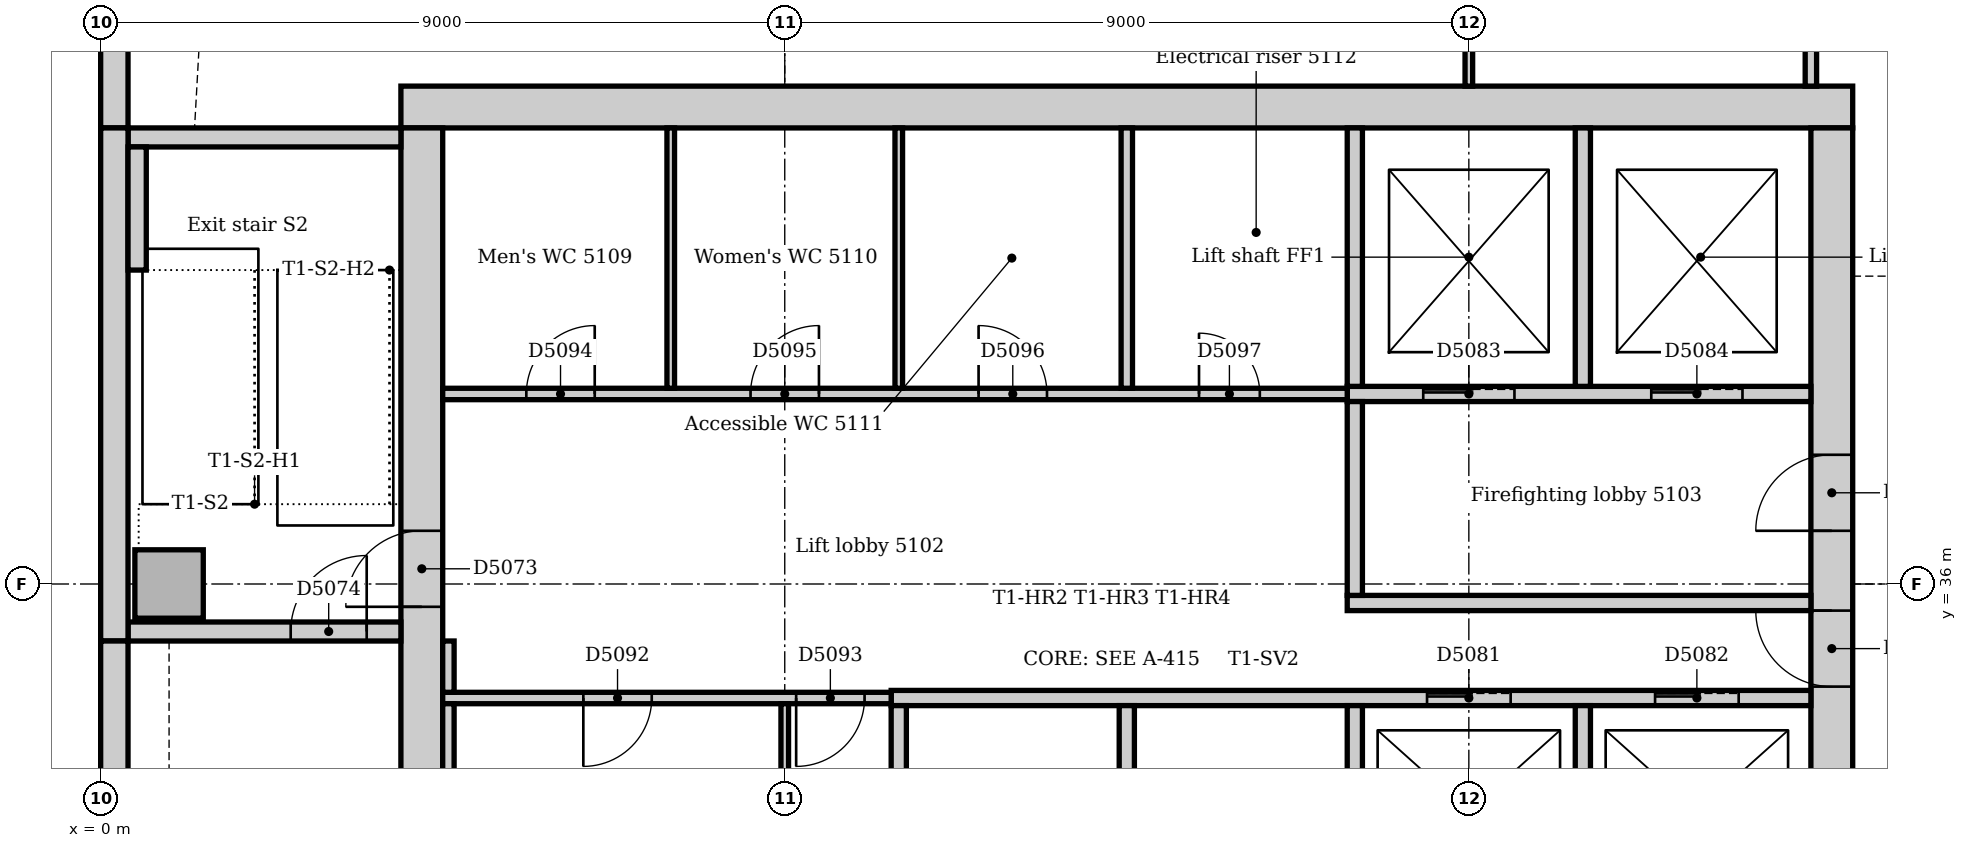
"""IFC4 building model, lengths in metres.
Left out: names, types, materials, properties, quantities, classifications, styles, units other than length and angle.
Written with IfcOpenShell. Run it as: python <this file> out.ifc"""

import sys

from ifc_helpers import new_model, si_unit, direction, frame, frame_2d, origin, origin_2d, place, context, subcontext, project, spatial, rectangle, extrude, element, fill, save


model = new_model("IFC4")
c1 = context("Model", 3, precision=1e-05, world=origin(), true_north=direction((0.0, 1.0)))
c2 = subcontext(c1, "Body", "Model", "MODEL_VIEW")
j1 = project(units=[si_unit("LENGTHUNIT", "METRE"), si_unit("PLANEANGLEUNIT", "RADIAN")], contexts=[c1])
p1 = place(None, origin())
s1 = spatial("IfcSite", under=j1, at=p1, CompositionType="ELEMENT")
p2 = place(p1, origin())
s2 = spatial("IfcBuilding", under=s1, at=p2, CompositionType="ELEMENT")
p3 = place(p2, frame((0.0, 0.0, 214.0)))
s3 = spatial("IfcBuildingStorey", under=s2, at=p3, CompositionType="ELEMENT", Elevation=214.0)
p4 = place(p3, frame((23.05, 42.275, 0.0), z_axis=(0.0, 0.0, 1.0), x_axis=(-1.0, 0.0, 0.0)))
e1 = element("IfcWall", 1, at=p4, inside=s3, PredefinedType="SOLIDWALL", context=c2, shape_type="SweptSolid", body=[
    extrude(rectangle(XDim=19.1, YDim=0.55, at=frame_2d((9.55, 0.0))), origin(), (0.0, 0.0, 1.0), 4.0),
])
p5 = place(p3, frame((22.775, 31.5, 0.0), z_axis=(0.0, 0.0, 1.0), x_axis=(0.0, 1.0, 0.0)))
e2 = element("IfcWall", 2, at=p5, inside=s3, PredefinedType="SOLIDWALL", context=c2, shape_type="SweptSolid", body=[
    extrude(rectangle(XDim=10.5, YDim=0.55, at=frame_2d((5.25, 0.0))), origin(), (0.0, 0.0, 1.0), 4.0),
])
p6 = place(p5, frame((3.15, 0.0, 0.0)))
e3 = element("IfcOpeningElement", 3, at=p6, cuts=e2, PredefinedType="OPENING", context=c2, shape_type="SweptSolid", body=[
    extrude(rectangle(XDim=1.0, YDim=2.1, at=frame_2d((0.5, 1.05))), frame((0.0, 0.285, 0.0), z_axis=(0.0, -1.0, 0.0), x_axis=(1.0, 0.0, 0.0)), (0.0, 0.0, 1.0), 0.57),
])
p7 = place(p5, frame((5.2, 0.0, 0.0)))
e4 = element("IfcOpeningElement", 4, at=p7, cuts=e2, PredefinedType="OPENING", context=c2, shape_type="SweptSolid", body=[
    extrude(rectangle(XDim=1.0, YDim=2.1, at=frame_2d((0.5, 1.05))), frame((0.0, 0.285, 0.0), z_axis=(0.0, -1.0, 0.0), x_axis=(1.0, 0.0, 0.0)), (0.0, 0.0, 1.0), 0.57),
])
p8 = place(p3, frame((4.225, 42.0, 0.0), z_axis=(0.0, 0.0, 1.0), x_axis=(0.0, -1.0, 0.0)))
e5 = element("IfcWall", 5, at=p8, inside=s3, PredefinedType="SOLIDWALL", context=c2, shape_type="SweptSolid", body=[
    extrude(rectangle(XDim=10.5, YDim=0.55, at=frame_2d((5.25, 0.0))), origin(), (0.0, 0.0, 1.0), 4.0),
])
p9 = place(p8, frame((5.3, 0.0, 0.0)))
e6 = element("IfcOpeningElement", 6, at=p9, cuts=e5, PredefinedType="OPENING", context=c2, shape_type="SweptSolid", body=[
    extrude(rectangle(XDim=1.0, YDim=2.1, at=frame_2d((0.5, 1.05))), frame((0.0, 0.285, 0.0), z_axis=(0.0, -1.0, 0.0), x_axis=(1.0, 0.0, 0.0)), (0.0, 0.0, 1.0), 0.57),
])
p10 = place(p3, frame((0.36, 35.375, 0.0), z_axis=(0.0, 0.0, 1.0), x_axis=(1.0, 0.0, 0.0)))
e7 = element("IfcWall", 7, at=p10, inside=s3, PredefinedType="SOLIDWALL", context=c2, shape_type="SweptSolid", body=[
    extrude(rectangle(XDim=3.59, YDim=0.25, at=frame_2d((1.795, 0.0))), origin(), (0.0, 0.0, 1.0), 4.0),
])
p11 = place(p10, frame((2.14, 0.0, 0.0)))
e8 = element("IfcOpeningElement", 8, at=p11, cuts=e7, PredefinedType="OPENING", context=c2, shape_type="SweptSolid", body=[
    extrude(rectangle(XDim=1.0, YDim=2.1, at=frame_2d((0.5, 1.05))), frame((0.0, 0.135, 0.0), z_axis=(0.0, -1.0, 0.0), x_axis=(1.0, 0.0, 0.0)), (0.0, 0.0, 1.0), 0.27),
])
p12 = place(p3, frame((3.95, 41.875, 0.0), z_axis=(0.0, 0.0, 1.0), x_axis=(-1.0, 0.0, 0.0)))
e9 = element("IfcWall", 9, at=p12, inside=s3, PredefinedType="SOLIDWALL", context=c2, shape_type="SweptSolid", body=[
    extrude(rectangle(XDim=3.59, YDim=0.25, at=frame_2d((1.795, 0.0))), origin(), (0.0, 0.0, 1.0), 4.0),
])
p13 = place(p3, frame((0.9, 36.0, 0.0), z_axis=(0.0, 0.0, 1.0), x_axis=(1.0, 0.0, 0.0)))
e10 = element("IfcColumn", 10, at=p13, inside=s3, PredefinedType="COLUMN", context=c2, shape_type="SweptSolid", body=[
    extrude(rectangle(XDim=0.9, YDim=0.9, at=origin_2d()), origin(), (0.0, 0.0, 1.0), 4.0),
])
p14 = place(p3, frame((0.18, 54.257, 0.0), z_axis=(0.0, 0.0, 1.0), x_axis=(0.0, -1.0, 0.0)))
e11 = element("IfcWall", 11, at=p14, inside=s3, PredefinedType="STANDARD", context=c2, shape_type="SweptSolid", body=[
    extrude(rectangle(XDim=12.257, YDim=0.36, at=frame_2d((6.129, 0.0))), origin(), (0.0, 0.0, 1.0), 3.85),
])
p15 = place(p14, frame((4.207, 0.0, 0.9)))
e12 = element("IfcOpeningElement", 12, at=p15, cuts=e11, PredefinedType="OPENING", context=c2, shape_type="SweptSolid", body=[
    extrude(rectangle(XDim=1.8, YDim=1.6, at=frame_2d((0.9, 0.8))), frame((0.0, 0.19, 0.0), z_axis=(0.0, -1.0, 0.0), x_axis=(1.0, 0.0, 0.0)), (0.0, 0.0, 1.0), 0.38),
])
p16 = place(p14, frame((7.607, 0.0, 0.9)))
e13 = element("IfcOpeningElement", 13, at=p16, cuts=e11, PredefinedType="OPENING", context=c2, shape_type="SweptSolid", body=[
    extrude(rectangle(XDim=3.3, YDim=1.6, at=frame_2d((1.65, 0.8))), frame((0.0, 0.19, 0.0), z_axis=(0.0, -1.0, 0.0), x_axis=(1.0, 0.0, 0.0)), (0.0, 0.0, 1.0), 0.38),
])
p17 = place(p3, frame((0.18, 42.0, 0.0), z_axis=(0.0, 0.0, 1.0), x_axis=(0.0, -1.0, 0.0)))
e14 = element("IfcWall", 14, at=p17, inside=s3, PredefinedType="STANDARD", context=c2, shape_type="SweptSolid", body=[
    extrude(rectangle(XDim=6.75, YDim=0.36, at=frame_2d((3.375, 0.0))), origin(), (0.0, 0.0, 1.0), 3.85),
])
p18 = place(p3, frame((0.18, 35.25, 0.0), z_axis=(0.0, 0.0, 1.0), x_axis=(0.0, -1.0, 0.0)))
e15 = element("IfcWall", 15, at=p18, inside=s3, PredefinedType="STANDARD", context=c2, shape_type="SweptSolid", body=[
    extrude(rectangle(XDim=7.5, YDim=0.36, at=frame_2d((3.75, 0.0))), origin(), (0.0, 0.0, 1.0), 3.85),
])
p19 = place(p3, frame((0.48, 40.13, 0.0), z_axis=(0.0, 0.0, 1.0), x_axis=(0.0, 1.0, 0.0)))
e16 = element("IfcWall", 16, at=p19, inside=s3, PredefinedType="STANDARD", context=c2, shape_type="SweptSolid", body=[
    extrude(rectangle(XDim=1.62, YDim=0.24, at=frame_2d((0.81, 0.0))), origin(), (0.0, 0.0, 1.0), 4.0),
])
p20 = place(p3, frame((16.4, 35.75, 0.0), z_axis=(0.0, 0.0, 1.0), x_axis=(1.0, 0.0, 0.0)))
e17 = element("IfcWall", 17, at=p20, inside=s3, PredefinedType="PARTITIONING", context=c2, shape_type="SweptSolid", body=[
    extrude(rectangle(XDim=6.1, YDim=0.2, at=frame_2d((3.05, 0.0))), origin(), (0.0, 0.0, 1.0), 3.85),
])
p21 = place(p3, frame((16.4, 38.5, 0.0), z_axis=(0.0, 0.0, 1.0), x_axis=(1.0, 0.0, 0.0)))
e18 = element("IfcWall", 18, at=p21, inside=s3, PredefinedType="PARTITIONING", context=c2, shape_type="SweptSolid", body=[
    extrude(rectangle(XDim=6.1, YDim=0.2, at=frame_2d((3.05, 0.0))), origin(), (0.0, 0.0, 1.0), 3.85),
])
p22 = place(p21, frame((1.0, 0.0, 0.0)))
e19 = element("IfcOpeningElement", 19, at=p22, cuts=e18, PredefinedType="OPENING", context=c2, shape_type="SweptSolid", body=[
    extrude(rectangle(XDim=1.2, YDim=2.1, at=frame_2d((0.6, 1.05))), frame((0.0, 0.11, 0.0), z_axis=(0.0, -1.0, 0.0), x_axis=(1.0, 0.0, 0.0)), (0.0, 0.0, 1.0), 0.22),
])
p23 = place(p21, frame((4.0, 0.0, 0.0)))
e20 = element("IfcOpeningElement", 20, at=p23, cuts=e18, PredefinedType="OPENING", context=c2, shape_type="SweptSolid", body=[
    extrude(rectangle(XDim=1.2, YDim=2.1, at=frame_2d((0.6, 1.05))), frame((0.0, 0.11, 0.0), z_axis=(0.0, -1.0, 0.0), x_axis=(1.0, 0.0, 0.0)), (0.0, 0.0, 1.0), 0.22),
])
p24 = place(p3, frame((16.5, 35.85, 0.0), z_axis=(0.0, 0.0, 1.0), x_axis=(0.0, 1.0, 0.0)))
e21 = element("IfcWall", 21, at=p24, inside=s3, PredefinedType="PARTITIONING", context=c2, shape_type="SweptSolid", body=[
    extrude(rectangle(XDim=2.55, YDim=0.2, at=frame_2d((1.275, 0.0))), origin(), (0.0, 0.0, 1.0), 3.85),
])
p25 = place(p3, frame((10.4, 34.5, 0.0), z_axis=(0.0, 0.0, 1.0), x_axis=(1.0, 0.0, 0.0)))
e22 = element("IfcWall", 22, at=p25, inside=s3, PredefinedType="PARTITIONING", context=c2, shape_type="SweptSolid", body=[
    extrude(rectangle(XDim=12.1, YDim=0.2, at=frame_2d((6.05, 0.0))), origin(), (0.0, 0.0, 1.0), 3.85),
])
p26 = place(p25, frame((7.05, 0.0, 0.0)))
e23 = element("IfcOpeningElement", 23, at=p26, cuts=e22, PredefinedType="OPENING", context=c2, shape_type="SweptSolid", body=[
    extrude(rectangle(XDim=1.1, YDim=2.1, at=frame_2d((0.55, 1.05))), frame((0.0, 0.11, 0.0), z_axis=(0.0, -1.0, 0.0), x_axis=(1.0, 0.0, 0.0)), (0.0, 0.0, 1.0), 0.22),
])
p27 = place(p25, frame((10.05, 0.0, 0.0)))
e24 = element("IfcOpeningElement", 24, at=p27, cuts=e22, PredefinedType="OPENING", context=c2, shape_type="SweptSolid", body=[
    extrude(rectangle(XDim=1.1, YDim=2.1, at=frame_2d((0.55, 1.05))), frame((0.0, 0.11, 0.0), z_axis=(0.0, -1.0, 0.0), x_axis=(1.0, 0.0, 0.0)), (0.0, 0.0, 1.0), 0.22),
])
for number, where, z_axis, x_axis in (
    (25, (10.5, 31.75, 0.0), (0.0, 0.0, 1.0), (0.0, 1.0, 0.0)),
    (26, (13.5, 31.75, 0.0), (0.0, 0.0, 1.0), (0.0, 1.0, 0.0)),
    (27, (16.5, 31.75, 0.0), (0.0, 0.0, 1.0), (0.0, 1.0, 0.0)),
    (28, (19.5, 31.75, 0.0), (0.0, 0.0, 1.0), (0.0, 1.0, 0.0)),
):
    element("IfcWall", number, at=place(p3, frame(where, z_axis=z_axis, x_axis=x_axis)), inside=s3, PredefinedType="PARTITIONING", context=c2, shape_type="SweptSolid", body=[
        extrude(rectangle(XDim=2.65, YDim=0.2, at=frame_2d((1.325, 0.0))), origin(), (0.0, 0.0, 1.0), 3.85),
    ])
for number, where, z_axis, x_axis in (
    (29, (16.5, 38.6, 0.0), (0.0, 0.0, 1.0), (0.0, 1.0, 0.0)),
    (30, (19.5, 38.6, 0.0), (0.0, 0.0, 1.0), (0.0, 1.0, 0.0)),
):
    element("IfcWall", number, at=place(p3, frame(where, z_axis=z_axis, x_axis=x_axis)), inside=s3, PredefinedType="PARTITIONING", context=c2, shape_type="SweptSolid", body=[
        extrude(rectangle(XDim=3.4, YDim=0.2, at=frame_2d((1.7, 0.0))), origin(), (0.0, 0.0, 1.0), 3.85),
    ])
p28 = place(p3, frame((4.5, 38.5, 0.0), z_axis=(0.0, 0.0, 1.0), x_axis=(1.0, 0.0, 0.0)))
e31 = element("IfcWall", 31, at=p28, inside=s3, PredefinedType="PARTITIONING", context=c2, shape_type="SweptSolid", body=[
    extrude(rectangle(XDim=11.9, YDim=0.15, at=frame_2d((5.95, 0.0))), origin(), (0.0, 0.0, 1.0), 3.85),
])
p29 = place(p28, frame((1.1, 0.0, 0.0)))
e32 = element("IfcOpeningElement", 32, at=p29, cuts=e31, PredefinedType="OPENING", context=c2, shape_type="SweptSolid", body=[
    extrude(rectangle(XDim=0.9, YDim=2.1, at=frame_2d((0.45, 1.05))), frame((0.0, 0.085, 0.0), z_axis=(0.0, -1.0, 0.0), x_axis=(1.0, 0.0, 0.0)), (0.0, 0.0, 1.0), 0.17),
])
p30 = place(p28, frame((4.05, 0.0, 0.0)))
e33 = element("IfcOpeningElement", 33, at=p30, cuts=e31, PredefinedType="OPENING", context=c2, shape_type="SweptSolid", body=[
    extrude(rectangle(XDim=0.9, YDim=2.1, at=frame_2d((0.45, 1.05))), frame((0.0, 0.085, 0.0), z_axis=(0.0, -1.0, 0.0), x_axis=(1.0, 0.0, 0.0)), (0.0, 0.0, 1.0), 0.17),
])
p31 = place(p28, frame((7.05, 0.0, 0.0)))
e34 = element("IfcOpeningElement", 34, at=p31, cuts=e31, PredefinedType="OPENING", context=c2, shape_type="SweptSolid", body=[
    extrude(rectangle(XDim=0.9, YDim=2.1, at=frame_2d((0.45, 1.05))), frame((0.0, 0.085, 0.0), z_axis=(0.0, -1.0, 0.0), x_axis=(1.0, 0.0, 0.0)), (0.0, 0.0, 1.0), 0.17),
])
p32 = place(p28, frame((9.95, 0.0, 0.0)))
e35 = element("IfcOpeningElement", 35, at=p32, cuts=e31, PredefinedType="OPENING", context=c2, shape_type="SweptSolid", body=[
    extrude(rectangle(XDim=0.8, YDim=2.1, at=frame_2d((0.4, 1.05))), frame((0.0, 0.085, 0.0), z_axis=(0.0, -1.0, 0.0), x_axis=(1.0, 0.0, 0.0)), (0.0, 0.0, 1.0), 0.17),
])
p33 = place(p3, frame((4.5, 34.5, 0.0), z_axis=(0.0, 0.0, 1.0), x_axis=(1.0, 0.0, 0.0)))
e36 = element("IfcWall", 36, at=p33, inside=s3, PredefinedType="PARTITIONING", context=c2, shape_type="SweptSolid", body=[
    extrude(rectangle(XDim=5.9, YDim=0.15, at=frame_2d((2.95, 0.0))), origin(), (0.0, 0.0, 1.0), 3.85),
])
p34 = place(p33, frame((1.85, 0.0, 0.0)))
e37 = element("IfcOpeningElement", 37, at=p34, cuts=e36, PredefinedType="OPENING", context=c2, shape_type="SweptSolid", body=[
    extrude(rectangle(XDim=0.9, YDim=2.1, at=frame_2d((0.45, 1.05))), frame((0.0, 0.085, 0.0), z_axis=(0.0, -1.0, 0.0), x_axis=(1.0, 0.0, 0.0)), (0.0, 0.0, 1.0), 0.17),
])
p35 = place(p33, frame((4.65, 0.0, 0.0)))
e38 = element("IfcOpeningElement", 38, at=p35, cuts=e36, PredefinedType="OPENING", context=c2, shape_type="SweptSolid", body=[
    extrude(rectangle(XDim=0.9, YDim=2.1, at=frame_2d((0.45, 1.05))), frame((0.0, 0.085, 0.0), z_axis=(0.0, -1.0, 0.0), x_axis=(1.0, 0.0, 0.0)), (0.0, 0.0, 1.0), 0.17),
])
p36 = place(p3, frame((4.575, 34.575, 0.0), z_axis=(0.0, 0.0, 1.0), x_axis=(0.0, 1.0, 0.0)))
e39 = element("IfcWall", 39, at=p36, inside=s3, PredefinedType="PARTITIONING", context=c2, shape_type="SweptSolid", body=[
    extrude(rectangle(XDim=0.675, YDim=0.15, at=frame_2d((0.338, 0.0))), origin(), (0.0, 0.0, 1.0), 3.85),
])
p37 = place(p3, frame((4.575, 31.75, 0.0), z_axis=(0.0, 0.0, 1.0), x_axis=(0.0, 1.0, 0.0)))
e40 = element("IfcWall", 40, at=p37, inside=s3, PredefinedType="PARTITIONING", context=c2, shape_type="SweptSolid", body=[
    extrude(rectangle(XDim=2.675, YDim=0.15, at=frame_2d((1.337, 0.0))), origin(), (0.0, 0.0, 1.0), 3.85),
])
p38 = place(p3, frame((22.5, 42.55, 0.0), z_axis=(0.0, 0.0, 1.0), x_axis=(0.0, 1.0, 0.0)))
e41 = element("IfcWall", 41, at=p38, inside=s3, PredefinedType="PARTITIONING", context=c2, shape_type="SweptSolid", body=[
    extrude(rectangle(XDim=2.375, YDim=0.15, at=frame_2d((1.188, 0.0))), origin(), (0.0, 0.0, 1.0), 3.85),
])
p39 = place(p3, frame((13.5, 38.575, 0.0), z_axis=(0.0, 0.0, 1.0), x_axis=(0.0, 1.0, 0.0)))
e42 = element("IfcWall", 42, at=p39, inside=s3, PredefinedType="PARTITIONING", context=c2, shape_type="SweptSolid", body=[
    extrude(rectangle(XDim=3.425, YDim=0.15, at=frame_2d((1.712, 0.0))), origin(), (0.0, 0.0, 1.0), 3.85),
])
p40 = place(p3, frame((18.0, 42.55, 0.0), z_axis=(0.0, 0.0, 1.0), x_axis=(0.0, 1.0, 0.0)))
e43 = element("IfcWall", 43, at=p40, inside=s3, PredefinedType="PARTITIONING", context=c2, shape_type="SweptSolid", body=[
    extrude(rectangle(XDim=1.15, YDim=0.1, at=frame_2d((0.575, 0.0))), origin(), (0.0, 0.0, 1.0), 3.652),
])
for number, where, z_axis, x_axis in (
    (44, (7.5, 38.575, 0.0), (0.0, 0.0, 1.0), (0.0, 1.0, 0.0)),
    (45, (10.5, 38.575, 0.0), (0.0, 0.0, 1.0), (0.0, 1.0, 0.0)),
):
    element("IfcWall", number, at=place(p3, frame(where, z_axis=z_axis, x_axis=x_axis)), inside=s3, PredefinedType="PARTITIONING", context=c2, shape_type="SweptSolid", body=[
        extrude(rectangle(XDim=3.425, YDim=0.1, at=frame_2d((1.712, 0.0))), origin(), (0.0, 0.0, 1.0), 3.85),
    ])
p41 = place(p3, frame((9.0, 31.75, 0.0), z_axis=(0.0, 0.0, 1.0), x_axis=(0.0, 1.0, 0.0)))
e46 = element("IfcWall", 46, at=p41, inside=s3, PredefinedType="PARTITIONING", context=c2, shape_type="SweptSolid", body=[
    extrude(rectangle(XDim=2.675, YDim=0.1, at=frame_2d((1.337, 0.0))), origin(), (0.0, 0.0, 1.0), 3.85),
])
p42 = place(p9, frame((1.0, 0.0, 0.0), z_axis=(0.0, 0.0, 1.0), x_axis=(-1.0, 0.0, 0.0)))
e47 = element("IfcDoor", 47, at=p42, inside=s3, OperationType="SINGLE_SWING_LEFT", PredefinedType="DOOR", context=c2, shape_type="SweptSolid", body=[
    extrude(rectangle(XDim=1.0, YDim=2.1, at=frame_2d((0.5, 1.05))), frame((0.0, 0.025, 0.0), z_axis=(0.0, -1.0, 0.0), x_axis=(1.0, 0.0, 0.0)), (0.0, 0.0, 1.0), 0.05),
])
fill(e6, e47)
p43 = place(p11, origin())
e48 = element("IfcDoor", 48, at=p43, inside=s3, OperationType="SINGLE_SWING_RIGHT", PredefinedType="DOOR", context=c2, shape_type="SweptSolid", body=[
    extrude(rectangle(XDim=1.0, YDim=2.1, at=frame_2d((0.5, 1.05))), frame((0.0, 0.025, 0.0), z_axis=(0.0, -1.0, 0.0), x_axis=(1.0, 0.0, 0.0)), (0.0, 0.0, 1.0), 0.05),
])
fill(e8, e48)
p44 = place(p26, origin())
e49 = element("IfcDoor", 49, at=p44, inside=s3, OperationType="SLIDING_TO_LEFT", PredefinedType="DOOR", context=c2, shape_type="SweptSolid", body=[
    extrude(rectangle(XDim=1.1, YDim=2.1, at=frame_2d((0.55, 1.05))), frame((0.0, 0.025, 0.0), z_axis=(0.0, -1.0, 0.0), x_axis=(1.0, 0.0, 0.0)), (0.0, 0.0, 1.0), 0.05),
])
fill(e23, e49)
p45 = place(p27, origin())
e50 = element("IfcDoor", 50, at=p45, inside=s3, OperationType="SLIDING_TO_LEFT", PredefinedType="DOOR", context=c2, shape_type="SweptSolid", body=[
    extrude(rectangle(XDim=1.1, YDim=2.1, at=frame_2d((0.55, 1.05))), frame((0.0, 0.025, 0.0), z_axis=(0.0, -1.0, 0.0), x_axis=(1.0, 0.0, 0.0)), (0.0, 0.0, 1.0), 0.05),
])
fill(e24, e50)
p46 = place(p22, origin())
e51 = element("IfcDoor", 51, at=p46, inside=s3, OperationType="SLIDING_TO_LEFT", PredefinedType="DOOR", context=c2, shape_type="SweptSolid", body=[
    extrude(rectangle(XDim=1.2, YDim=2.1, at=frame_2d((0.6, 1.05))), frame((0.0, 0.025, 0.0), z_axis=(0.0, -1.0, 0.0), x_axis=(1.0, 0.0, 0.0)), (0.0, 0.0, 1.0), 0.05),
])
fill(e19, e51)
p47 = place(p23, origin())
e52 = element("IfcDoor", 52, at=p47, inside=s3, OperationType="SLIDING_TO_LEFT", PredefinedType="DOOR", context=c2, shape_type="SweptSolid", body=[
    extrude(rectangle(XDim=1.2, YDim=2.1, at=frame_2d((0.6, 1.05))), frame((0.0, 0.025, 0.0), z_axis=(0.0, -1.0, 0.0), x_axis=(1.0, 0.0, 0.0)), (0.0, 0.0, 1.0), 0.05),
])
fill(e20, e52)
p48 = place(p6, origin())
e53 = element("IfcDoor", 53, at=p48, inside=s3, OperationType="SINGLE_SWING_RIGHT", PredefinedType="DOOR", context=c2, shape_type="SweptSolid", body=[
    extrude(rectangle(XDim=1.0, YDim=2.1, at=frame_2d((0.5, 1.05))), frame((0.0, 0.025, 0.0), z_axis=(0.0, -1.0, 0.0), x_axis=(1.0, 0.0, 0.0)), (0.0, 0.0, 1.0), 0.05),
])
fill(e3, e53)
p49 = place(p7, origin())
e54 = element("IfcDoor", 54, at=p49, inside=s3, OperationType="SINGLE_SWING_LEFT", PredefinedType="DOOR", context=c2, shape_type="SweptSolid", body=[
    extrude(rectangle(XDim=1.0, YDim=2.1, at=frame_2d((0.5, 1.05))), frame((0.0, 0.025, 0.0), z_axis=(0.0, -1.0, 0.0), x_axis=(1.0, 0.0, 0.0)), (0.0, 0.0, 1.0), 0.05),
])
fill(e4, e54)
p50 = place(p34, frame((0.9, 0.0, 0.0), z_axis=(0.0, 0.0, 1.0), x_axis=(-1.0, 0.0, 0.0)))
e55 = element("IfcDoor", 55, at=p50, inside=s3, OperationType="SINGLE_SWING_RIGHT", PredefinedType="DOOR", context=c2, shape_type="SweptSolid", body=[
    extrude(rectangle(XDim=0.9, YDim=2.1, at=frame_2d((0.45, 1.05))), frame((0.0, 0.025, 0.0), z_axis=(0.0, -1.0, 0.0), x_axis=(1.0, 0.0, 0.0)), (0.0, 0.0, 1.0), 0.05),
])
fill(e37, e55)
p51 = place(p35, frame((0.9, 0.0, 0.0), z_axis=(0.0, 0.0, 1.0), x_axis=(-1.0, 0.0, 0.0)))
e56 = element("IfcDoor", 56, at=p51, inside=s3, OperationType="SINGLE_SWING_RIGHT", PredefinedType="DOOR", context=c2, shape_type="SweptSolid", body=[
    extrude(rectangle(XDim=0.9, YDim=2.1, at=frame_2d((0.45, 1.05))), frame((0.0, 0.025, 0.0), z_axis=(0.0, -1.0, 0.0), x_axis=(1.0, 0.0, 0.0)), (0.0, 0.0, 1.0), 0.05),
])
fill(e38, e56)
p52 = place(p29, origin())
e57 = element("IfcDoor", 57, at=p52, inside=s3, OperationType="SINGLE_SWING_RIGHT", PredefinedType="DOOR", context=c2, shape_type="SweptSolid", body=[
    extrude(rectangle(XDim=0.9, YDim=2.1, at=frame_2d((0.45, 1.05))), frame((0.0, 0.025, 0.0), z_axis=(0.0, -1.0, 0.0), x_axis=(1.0, 0.0, 0.0)), (0.0, 0.0, 1.0), 0.05),
])
fill(e32, e57)
p53 = place(p30, origin())
e58 = element("IfcDoor", 58, at=p53, inside=s3, OperationType="SINGLE_SWING_RIGHT", PredefinedType="DOOR", context=c2, shape_type="SweptSolid", body=[
    extrude(rectangle(XDim=0.9, YDim=2.1, at=frame_2d((0.45, 1.05))), frame((0.0, 0.025, 0.0), z_axis=(0.0, -1.0, 0.0), x_axis=(1.0, 0.0, 0.0)), (0.0, 0.0, 1.0), 0.05),
])
fill(e33, e58)
p54 = place(p31, origin())
e59 = element("IfcDoor", 59, at=p54, inside=s3, OperationType="SINGLE_SWING_LEFT", PredefinedType="DOOR", context=c2, shape_type="SweptSolid", body=[
    extrude(rectangle(XDim=0.9, YDim=2.1, at=frame_2d((0.45, 1.05))), frame((0.0, 0.025, 0.0), z_axis=(0.0, -1.0, 0.0), x_axis=(1.0, 0.0, 0.0)), (0.0, 0.0, 1.0), 0.05),
])
fill(e34, e59)
p55 = place(p32, origin())
e60 = element("IfcDoor", 60, at=p55, inside=s3, OperationType="SINGLE_SWING_LEFT", PredefinedType="DOOR", context=c2, shape_type="SweptSolid", body=[
    extrude(rectangle(XDim=0.8, YDim=2.1, at=frame_2d((0.4, 1.05))), frame((0.0, 0.025, 0.0), z_axis=(0.0, -1.0, 0.0), x_axis=(1.0, 0.0, 0.0)), (0.0, 0.0, 1.0), 0.05),
])
fill(e35, e60)
save(model, sys.argv[1])
